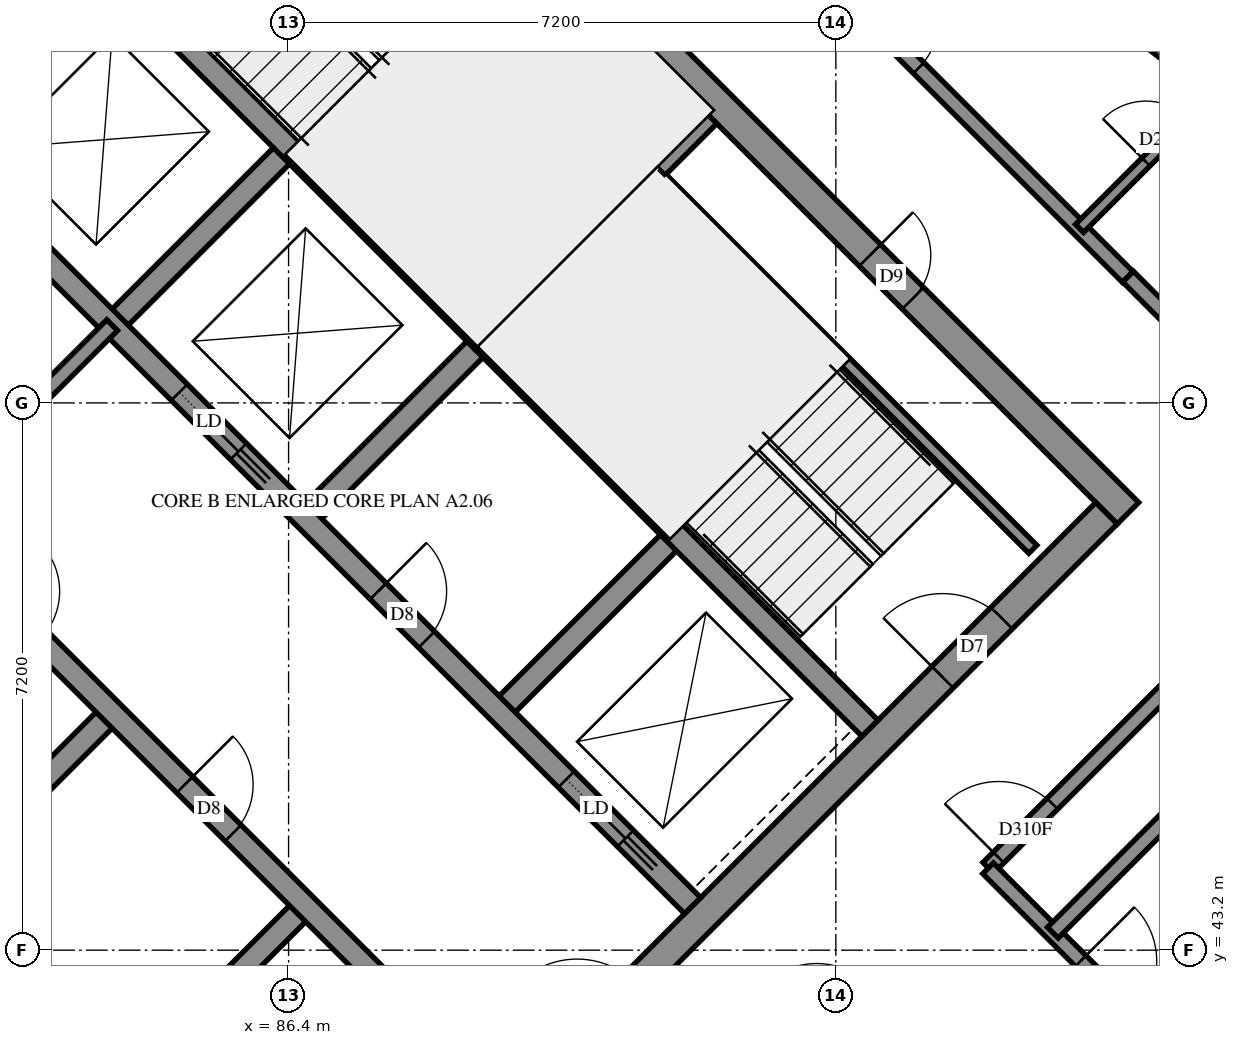
"""IFC4 building model, lengths in metres.
Left out: names, types, materials, properties, quantities, classifications, styles, units other than length and angle.
Written with IfcOpenShell. Run it as: python <this file> out.ifc"""

import sys

from ifc_helpers import new_model, si_unit, direction, frame, frame_2d, origin, place, context, subcontext, project, spatial, polyline, rectangle, outline, extrude, element, fill, save


model = new_model("IFC4")
c1 = context("Model", 3, precision=1e-05, world=origin(), true_north=direction((0.0, 1.0)))
c2 = subcontext(c1, "Body", "Model", "MODEL_VIEW")
j1 = project(units=[si_unit("LENGTHUNIT", "METRE"), si_unit("PLANEANGLEUNIT", "RADIAN")], contexts=[c1])
p1 = place(None, origin())
s1 = spatial("IfcSite", under=j1, at=p1, CompositionType="ELEMENT")
p2 = place(p1, origin())
s2 = spatial("IfcBuilding", under=s1, at=p2, CompositionType="ELEMENT")
p3 = place(p2, frame((0.0, 0.0, 260.8)))
s3 = spatial("IfcBuildingStorey", under=s2, at=p3, CompositionType="ELEMENT", Elevation=260.8)
p4 = place(p3, frame((76.23, 49.231, -0.3), z_axis=(0.0, 0.0, 1.0), x_axis=(0.7071034917, -0.7071100706, 0.0)))
e1 = element("IfcWall", 1, at=p4, inside=s3, PredefinedType="SHEAR", context=c2, shape_type="SweptSolid", body=[
    extrude(rectangle(XDim=15.2, YDim=0.4, at=frame_2d((7.6, 0.0))), origin(), (0.0, 0.0, 1.0), 2.7),
])
p5 = place(p3, frame((86.695, 59.696, -0.3), z_axis=(0.0, 0.0, 1.0), x_axis=(0.7071100706, -0.7071034917, 0.0)))
e2 = element("IfcWall", 2, at=p5, inside=s3, PredefinedType="SHEAR", context=c2, shape_type="SweptSolid", body=[
    extrude(rectangle(XDim=15.2, YDim=0.4, at=frame_2d((7.6, 0.0))), origin(), (0.0, 0.0, 1.0), 2.7),
])
p6 = place(p5, frame((10.4, 0.0, 0.3)))
e3 = element("IfcOpeningElement", 3, at=p6, cuts=e2, PredefinedType="OPENING", context=c2, shape_type="SweptSolid", body=[
    extrude(rectangle(XDim=0.8, YDim=2.1, at=frame_2d((0.4, 1.05))), frame((0.0, 0.21, 0.0), z_axis=(0.0, -1.0, 0.0), x_axis=(1.0, 0.0, 0.0)), (0.0, 0.0, 1.0), 0.42),
])
p7 = place(p3, frame((76.513, 49.231, -0.3), z_axis=(0.0, 0.0, 1.0), x_axis=(0.7071067812, 0.7071067812, 0.0)))
e4 = element("IfcWall", 4, at=p7, inside=s3, PredefinedType="SHEAR", context=c2, shape_type="SweptSolid", body=[
    extrude(rectangle(XDim=14.4, YDim=0.4, at=frame_2d((7.2, 0.0))), origin(), (0.0, 0.0, 1.0), 2.7),
])
p8 = place(p7, frame((4.55, 0.0, 0.3)))
e5 = element("IfcOpeningElement", 5, at=p8, cuts=e4, PredefinedType="OPENING", context=c2, shape_type="SweptSolid", body=[
    extrude(rectangle(XDim=1.1, YDim=2.1, at=frame_2d((0.55, 1.05))), frame((0.0, 0.21, 0.0), z_axis=(0.0, -1.0, 0.0), x_axis=(1.0, 0.0, 0.0)), (0.0, 0.0, 1.0), 0.42),
])
p9 = place(p7, frame((11.35, 0.0, 0.3)))
e6 = element("IfcOpeningElement", 6, at=p9, cuts=e4, PredefinedType="OPENING", context=c2, shape_type="SweptSolid", body=[
    extrude(rectangle(XDim=1.1, YDim=2.1, at=frame_2d((0.55, 1.05))), frame((0.0, 0.21, 0.0), z_axis=(0.0, -1.0, 0.0), x_axis=(1.0, 0.0, 0.0)), (0.0, 0.0, 1.0), 0.42),
])
p10 = place(p3, frame((86.978, 38.766, -0.3), z_axis=(0.0, 0.0, 1.0), x_axis=(0.7071067812, 0.7071067812, 0.0)))
e7 = element("IfcWall", 7, at=p10, inside=s3, PredefinedType="SHEAR", context=c2, shape_type="SweptSolid", body=[
    extrude(rectangle(XDim=14.4, YDim=0.4, at=frame_2d((7.2, 0.0))), origin(), (0.0, 0.0, 1.0), 2.7),
])
p11 = place(p10, frame((4.55, 0.0, 0.3)))
e8 = element("IfcOpeningElement", 8, at=p11, cuts=e7, PredefinedType="OPENING", context=c2, shape_type="SweptSolid", body=[
    extrude(rectangle(XDim=1.1, YDim=2.1, at=frame_2d((0.55, 1.05))), frame((0.0, 0.21, 0.0), z_axis=(0.0, -1.0, 0.0), x_axis=(1.0, 0.0, 0.0)), (0.0, 0.0, 1.0), 0.42),
])
p12 = place(p10, frame((11.35, 0.0, 0.3)))
e9 = element("IfcOpeningElement", 9, at=p12, cuts=e7, PredefinedType="OPENING", context=c2, shape_type="SweptSolid", body=[
    extrude(rectangle(XDim=1.1, YDim=2.1, at=frame_2d((0.55, 1.05))), frame((0.0, 0.21, 0.0), z_axis=(0.0, -1.0, 0.0), x_axis=(1.0, 0.0, 0.0)), (0.0, 0.0, 1.0), 0.42),
])
p13 = place(p3, frame((84.079, 51.423, 0.0), z_axis=(0.0, 0.0, 1.0), x_axis=(0.7071219326, 0.7070916295, 0.0)))
e10 = element("IfcWall", 10, at=p13, inside=s3, PredefinedType="SOLIDWALL", context=c2, shape_type="SweptSolid", body=[
    extrude(rectangle(XDim=3.3, YDim=0.3, at=frame_2d((1.65, 0.0))), origin(), (0.0, 0.0, 1.0), 3.1),
])
p14 = place(p3, frame((81.746, 43.999, 0.0), z_axis=(0.0, 0.0, 1.0), x_axis=(0.7071067812, 0.7071067812, 0.0)))
e11 = element("IfcWall", 11, at=p14, inside=s3, PredefinedType="SOLIDWALL", context=c2, shape_type="SweptSolid", body=[
    extrude(rectangle(XDim=3.3, YDim=0.3, at=frame_2d((1.65, 0.0))), origin(), (0.0, 0.0, 1.0), 3.1),
])
p15 = place(p3, frame((86.625, 48.878, 0.0), z_axis=(0.0, 0.0, 1.0), x_axis=(0.7071067812, 0.7071067812, 0.0)))
e12 = element("IfcWall", 12, at=p15, inside=s3, PredefinedType="SOLIDWALL", context=c2, shape_type="SweptSolid", body=[
    extrude(rectangle(XDim=3.3, YDim=0.3, at=frame_2d((1.65, 0.0))), origin(), (0.0, 0.0, 1.0), 3.1),
])
p16 = place(p3, frame((84.291, 41.453, 0.0), z_axis=(0.0, 0.0, 1.0), x_axis=(0.7071067812, 0.7071067812, 0.0)))
e13 = element("IfcWall", 13, at=p16, inside=s3, PredefinedType="SOLIDWALL", context=c2, shape_type="SweptSolid", body=[
    extrude(rectangle(XDim=3.3, YDim=0.3, at=frame_2d((1.65, 0.0))), origin(), (0.0, 0.0, 1.0), 3.1),
])
p17 = place(p3, frame((89.17, 46.332, 0.0), z_axis=(0.0, 0.0, 1.0), x_axis=(0.7071067812, 0.7071067812, 0.0)))
e14 = element("IfcWall", 14, at=p17, inside=s3, PredefinedType="SOLIDWALL", context=c2, shape_type="SweptSolid", body=[
    extrude(rectangle(XDim=3.3, YDim=0.3, at=frame_2d((1.65, 0.0))), origin(), (0.0, 0.0, 1.0), 3.1),
])
p18 = place(p3, frame((78.988, 51.423, 0.0), z_axis=(0.0, 0.0, 1.0), x_axis=(0.7071067812, -0.7071067812, 0.0)))
e15 = element("IfcWall", 15, at=p18, inside=s3, PredefinedType="SOLIDWALL", context=c2, shape_type="SweptSolid", body=[
    extrude(rectangle(XDim=14.4, YDim=0.3, at=frame_2d((7.2, 0.0))), origin(), (0.0, 0.0, 1.0), 3.1),
])
p19 = place(p18, frame((1.35, 0.0, 0.0)))
e16 = element("IfcOpeningElement", 16, at=p19, cuts=e15, PredefinedType="OPENING", context=c2, shape_type="SweptSolid", body=[
    extrude(rectangle(XDim=0.9, YDim=2.1, at=frame_2d((0.45, 1.05))), frame((0.0, 0.16, 0.0), z_axis=(0.0, -1.0, 0.0), x_axis=(1.0, 0.0, 0.0)), (0.0, 0.0, 1.0), 0.32),
])
p20 = place(p18, frame((4.95, 0.0, 0.0)))
e17 = element("IfcOpeningElement", 17, at=p20, cuts=e15, PredefinedType="OPENING", context=c2, shape_type="SweptSolid", body=[
    extrude(rectangle(XDim=0.9, YDim=2.1, at=frame_2d((0.45, 1.05))), frame((0.0, 0.16, 0.0), z_axis=(0.0, -1.0, 0.0), x_axis=(1.0, 0.0, 0.0)), (0.0, 0.0, 1.0), 0.32),
])
p21 = place(p18, frame((8.55, 0.0, 0.0)))
e18 = element("IfcOpeningElement", 18, at=p21, cuts=e15, PredefinedType="OPENING", context=c2, shape_type="SweptSolid", body=[
    extrude(rectangle(XDim=0.9, YDim=2.1, at=frame_2d((0.45, 1.05))), frame((0.0, 0.16, 0.0), z_axis=(0.0, -1.0, 0.0), x_axis=(1.0, 0.0, 0.0)), (0.0, 0.0, 1.0), 0.32),
])
p22 = place(p18, frame((12.05, 0.0, 0.0)))
e19 = element("IfcOpeningElement", 19, at=p22, cuts=e15, PredefinedType="OPENING", context=c2, shape_type="SweptSolid", body=[
    extrude(rectangle(XDim=1.1, YDim=2.1, at=frame_2d((0.55, 1.05))), frame((0.0, 0.16, 0.0), z_axis=(0.0, -1.0, 0.0), x_axis=(1.0, 0.0, 0.0)), (0.0, 0.0, 1.0), 0.32),
])
p23 = place(p3, frame((81.534, 53.969, 0.0), z_axis=(0.0, 0.0, 1.0), x_axis=(0.707103309, -0.7071102534, 0.0)))
e20 = element("IfcWall", 20, at=p23, inside=s3, PredefinedType="SOLIDWALL", context=c2, shape_type="SweptSolid", body=[
    extrude(rectangle(XDim=14.4, YDim=0.3, at=frame_2d((7.2, 0.0))), origin(), (0.0, 0.0, 1.0), 3.1),
])
p24 = place(p23, frame((8.55, 0.0, 0.0)))
e21 = element("IfcOpeningElement", 21, at=p24, cuts=e20, PredefinedType="OPENING", context=c2, shape_type="SweptSolid", body=[
    extrude(rectangle(XDim=0.9, YDim=2.1, at=frame_2d((0.45, 1.05))), frame((0.0, 0.16, 0.0), z_axis=(0.0, -1.0, 0.0), x_axis=(1.0, 0.0, 0.0)), (0.0, 0.0, 1.0), 0.32),
])
p25 = place(p23, frame((1.25, 0.0, 0.0)))
e22 = element("IfcOpeningElement", 22, at=p25, cuts=e20, PredefinedType="OPENING", context=c2, shape_type="SweptSolid", body=[
    extrude(rectangle(XDim=1.1, YDim=2.1, at=frame_2d((0.55, 1.05))), frame((0.0, 0.16, 0.0), z_axis=(0.0, -1.0, 0.0), x_axis=(1.0, 0.0, 0.0)), (0.0, 0.0, 1.0), 0.32),
])
p26 = place(p23, frame((4.85, 0.0, 0.0)))
e23 = element("IfcOpeningElement", 23, at=p26, cuts=e20, PredefinedType="OPENING", context=c2, shape_type="SweptSolid", body=[
    extrude(rectangle(XDim=1.1, YDim=2.1, at=frame_2d((0.55, 1.05))), frame((0.0, 0.16, 0.0), z_axis=(0.0, -1.0, 0.0), x_axis=(1.0, 0.0, 0.0)), (0.0, 0.0, 1.0), 0.32),
])
p27 = place(p23, frame((12.05, 0.0, 0.0)))
e24 = element("IfcOpeningElement", 24, at=p27, cuts=e20, PredefinedType="OPENING", context=c2, shape_type="SweptSolid", body=[
    extrude(rectangle(XDim=1.1, YDim=2.1, at=frame_2d((0.55, 1.05))), frame((0.0, 0.16, 0.0), z_axis=(0.0, -1.0, 0.0), x_axis=(1.0, 0.0, 0.0)), (0.0, 0.0, 1.0), 0.32),
])
for number, where, z_axis, x_axis in (
    (25, (83.867, 56.302, 0.0), (0.0, 0.0, 1.0), (0.707, -0.707, 0.0)),
    (26, (88.958, 51.211, 0.0), (0.0, 0.0, 1.0), (0.707, -0.707, 0.0)),
):
    element("IfcWall", number, at=place(p3, frame(where, z_axis=z_axis, x_axis=x_axis)), inside=s3, PredefinedType="SOLIDWALL", context=c2, shape_type="SweptSolid", body=[
        extrude(rectangle(XDim=7.2, YDim=0.3, at=frame_2d((3.6, 0.0))), origin(), (0.0, 0.0, 1.0), 3.1),
    ])
p28 = place(p3, frame((88.958, 51.211, 0.0), z_axis=(0.0, 0.0, 1.0), x_axis=(0.7071067812, 0.7071067812, 0.0)))
e27 = element("IfcWall", 27, at=p28, inside=s3, PredefinedType="SOLIDWALL", context=c2, shape_type="SweptSolid", body=[
    extrude(rectangle(XDim=4.2, YDim=0.3, at=frame_2d((2.1, 0.0))), origin(), (0.0, 0.0, 1.0), 3.1),
])
p29 = place(p3, frame((98.403, 54.811, 0.0), z_axis=(0.0, 0.0, 1.0), x_axis=(-0.795543631, 0.605896304, 0.0)))
e28 = element("IfcWall", 28, at=p29, inside=s3, PredefinedType="SOLIDWALL", context=c2, shape_type="SweptSolid", body=[
    extrude(outline(polyline([(-0.03, -0.225), (3.333, -0.225), (3.394, 0.225), (0.03, 0.225), (-0.03, -0.225)])), origin(), (0.0, 0.0, 1.0), 3.1),
])
p30 = place(p29, frame((1.251, 0.0, 0.45)))
e29 = element("IfcOpeningElement", 29, at=p30, cuts=e28, PredefinedType="OPENING", context=c2, shape_type="SweptSolid", body=[
    extrude(rectangle(XDim=1.2, YDim=2.55, at=frame_2d((0.6, 1.275))), frame((0.0, 0.235, 0.0), z_axis=(0.0, -1.0, 0.0), x_axis=(1.0, 0.0, 0.0)), (0.0, 0.0, 1.0), 0.47),
])
p31 = place(p3, frame((91.313, 53.354, 0.0), z_axis=(0.0, 0.0, 1.0), x_axis=(0.7071140275, -0.7070995348, 0.0)))
e30 = element("IfcWall", 30, at=p31, inside=s3, PredefinedType="PARTITIONING", context=c2, shape_type="SweptSolid", body=[
    extrude(rectangle(XDim=6.9, YDim=0.15, at=frame_2d((3.45, 0.0))), origin(), (0.0, 0.0, 1.0), 3.1),
])
p32 = place(p3, frame((81.534, 48.878, 0.0), z_axis=(0.0, 0.0, 1.0), x_axis=(0.707092892, 0.7071206701, 0.0)))
e31 = element("IfcWall", 31, at=p32, inside=s3, PredefinedType="PARTITIONING", context=c2, shape_type="SweptSolid", body=[
    extrude(rectangle(XDim=3.6, YDim=0.2, at=frame_2d((1.8, 0.0))), origin(), (0.0, 0.0, 1.0), 3.1),
])
p33 = place(p3, frame((95.605, 44.283, 0.0), z_axis=(0.0, 0.0, 1.0), x_axis=(0.7071067812, 0.7071067812, 0.0)))
e32 = element("IfcWall", 32, at=p33, inside=s3, PredefinedType="PARTITIONING", context=c2, shape_type="SweptSolid", body=[
    extrude(rectangle(XDim=6.8, YDim=0.2, at=frame_2d((3.4, 0.0))), origin(), (0.0, 0.0, 1.0), 3.1),
])
p34 = place(p33, frame((0.193, 0.0, 0.0)))
e33 = element("IfcOpeningElement", 33, at=p34, cuts=e32, PredefinedType="OPENING", context=c2, shape_type="SweptSolid", body=[
    extrude(rectangle(XDim=1.0, YDim=2.1, at=frame_2d((0.5, 1.05))), frame((0.0, 0.11, 0.0), z_axis=(0.0, -1.0, 0.0), x_axis=(1.0, 0.0, 0.0)), (0.0, 0.0, 1.0), 0.22),
])
p35 = place(p3, frame((93.621, 55.875, 0.0), z_axis=(0.0, 0.0, 1.0), x_axis=(0.7071623255, -0.7070512325, 0.0)))
e34 = element("IfcWall", 34, at=p35, inside=s3, PredefinedType="PARTITIONING", context=c2, shape_type="SweptSolid", body=[
    extrude(rectangle(XDim=5.401, YDim=0.2, at=frame_2d((2.7, 0.0))), origin(), (0.0, 0.0, 1.0), 3.1),
])
p36 = place(p35, frame((0.611, 0.0, 0.0)))
e35 = element("IfcOpeningElement", 35, at=p36, cuts=e34, PredefinedType="OPENING", context=c2, shape_type="SweptSolid", body=[
    extrude(rectangle(XDim=0.9, YDim=2.1, at=frame_2d((0.45, 1.05))), frame((0.0, 0.11, 0.0), z_axis=(0.0, -1.0, 0.0), x_axis=(1.0, 0.0, 0.0)), (0.0, 0.0, 1.0), 0.22),
])
p37 = place(p3, frame((95.603, 44.277, 0.0), z_axis=(0.0, 0.0, 1.0), x_axis=(0.7071067812, -0.7071067812, 0.0)))
e36 = element("IfcWall", 36, at=p37, inside=s3, PredefinedType="PARTITIONING", context=c2, shape_type="SweptSolid", body=[
    extrude(rectangle(XDim=4.797, YDim=0.2, at=frame_2d((2.398, 0.0))), origin(), (0.0, 0.0, 1.0), 3.1),
])
p38 = place(p37, frame((1.723, 0.0, 0.0)))
e37 = element("IfcOpeningElement", 37, at=p38, cuts=e36, PredefinedType="OPENING", context=c2, shape_type="SweptSolid", body=[
    extrude(rectangle(XDim=1.0, YDim=2.1, at=frame_2d((0.5, 1.05))), frame((0.0, 0.11, 0.0), z_axis=(0.0, -1.0, 0.0), x_axis=(1.0, 0.0, 0.0)), (0.0, 0.0, 1.0), 0.22),
])
p39 = place(p3, frame((96.455, 43.431, 0.0), z_axis=(0.0, 0.0, 1.0), x_axis=(0.7068409254, 0.707372537, 0.0)))
e38 = element("IfcWall", 38, at=p39, inside=s3, PredefinedType="PARTITIONING", context=c2, shape_type="SweptSolid", body=[
    extrude(rectangle(XDim=3.95, YDim=0.2, at=frame_2d((1.975, 0.0))), origin(), (0.0, 0.0, 1.0), 3.1),
])
p40 = place(p3, frame((96.806, 52.696, 0.0), z_axis=(0.0, 0.0, 1.0), x_axis=(0.7071067812, 0.7071067812, 0.0)))
e39 = element("IfcWall", 39, at=p40, inside=s3, PredefinedType="PARTITIONING", context=c2, shape_type="SweptSolid", body=[
    extrude(rectangle(XDim=2.348, YDim=0.15, at=frame_2d((1.174, 0.0))), origin(), (0.0, 0.0, 1.0), 3.1),
])
p41 = place(p40, frame((1.236, 0.0, 0.0)))
e40 = element("IfcOpeningElement", 40, at=p41, cuts=e39, PredefinedType="OPENING", context=c2, shape_type="SweptSolid", body=[
    extrude(rectangle(XDim=0.8, YDim=2.1, at=frame_2d((0.4, 1.05))), frame((0.0, 0.085, 0.0), z_axis=(0.0, -1.0, 0.0), x_axis=(1.0, 0.0, 0.0)), (0.0, 0.0, 1.0), 0.17),
])
p42 = place(p3, frame((97.445, 52.061, 0.0), z_axis=(0.0, 0.0, 1.0), x_axis=(0.7059292536, -0.7082823511, 0.0)))
e41 = element("IfcWall", 41, at=p42, inside=s3, PredefinedType="PARTITIONING", context=c2, shape_type="SweptSolid", body=[
    extrude(rectangle(XDim=0.85, YDim=0.2, at=frame_2d((0.425, 0.0))), origin(), (0.0, 0.0, 1.0), 3.1),
])
p43 = place(p6, origin())
e42 = element("IfcDoor", 42, at=p43, inside=s3, OperationType="SINGLE_SWING_RIGHT", PredefinedType="DOOR", context=c2, shape_type="SweptSolid", body=[
    extrude(rectangle(XDim=0.8, YDim=2.1, at=frame_2d((0.4, 1.05))), frame((0.0, 0.025, 0.0), z_axis=(0.0, -1.0, 0.0), x_axis=(1.0, 0.0, 0.0)), (0.0, 0.0, 1.0), 0.05),
])
fill(e3, e42)
p44 = place(p12, origin())
e43 = element("IfcDoor", 43, at=p44, inside=s3, OperationType="SINGLE_SWING_RIGHT", PredefinedType="DOOR", context=c2, shape_type="SweptSolid", body=[
    extrude(rectangle(XDim=1.1, YDim=2.1, at=frame_2d((0.55, 1.05))), frame((0.0, 0.025, 0.0), z_axis=(0.0, -1.0, 0.0), x_axis=(1.0, 0.0, 0.0)), (0.0, 0.0, 1.0), 0.05),
])
fill(e9, e43)
p45 = place(p21, origin())
e44 = element("IfcDoor", 44, at=p45, inside=s3, OperationType="SINGLE_SWING_LEFT", PredefinedType="DOOR", context=c2, shape_type="SweptSolid", body=[
    extrude(rectangle(XDim=0.9, YDim=2.1, at=frame_2d((0.45, 1.05))), frame((0.0, 0.025, 0.0), z_axis=(0.0, -1.0, 0.0), x_axis=(1.0, 0.0, 0.0)), (0.0, 0.0, 1.0), 0.05),
])
fill(e18, e44)
p46 = place(p24, origin())
e45 = element("IfcDoor", 45, at=p46, inside=s3, OperationType="SINGLE_SWING_LEFT", PredefinedType="DOOR", context=c2, shape_type="SweptSolid", body=[
    extrude(rectangle(XDim=0.9, YDim=2.1, at=frame_2d((0.45, 1.05))), frame((0.0, 0.025, 0.0), z_axis=(0.0, -1.0, 0.0), x_axis=(1.0, 0.0, 0.0)), (0.0, 0.0, 1.0), 0.05),
])
fill(e21, e45)
p47 = place(p26, origin())
e46 = element("IfcDoor", 46, at=p47, inside=s3, OperationType="SLIDING_TO_RIGHT", PredefinedType="DOOR", context=c2, shape_type="SweptSolid", body=[
    extrude(rectangle(XDim=1.1, YDim=2.1, at=frame_2d((0.55, 1.05))), frame((0.0, 0.025, 0.0), z_axis=(0.0, -1.0, 0.0), x_axis=(1.0, 0.0, 0.0)), (0.0, 0.0, 1.0), 0.05),
])
fill(e23, e46)
p48 = place(p27, origin())
e47 = element("IfcDoor", 47, at=p48, inside=s3, OperationType="SLIDING_TO_RIGHT", PredefinedType="DOOR", context=c2, shape_type="SweptSolid", body=[
    extrude(rectangle(XDim=1.1, YDim=2.1, at=frame_2d((0.55, 1.05))), frame((0.0, 0.025, 0.0), z_axis=(0.0, -1.0, 0.0), x_axis=(1.0, 0.0, 0.0)), (0.0, 0.0, 1.0), 0.05),
])
fill(e24, e47)
p49 = place(p34, origin())
e48 = element("IfcDoor", 48, at=p49, inside=s3, OperationType="SINGLE_SWING_LEFT", PredefinedType="DOOR", context=c2, shape_type="SweptSolid", body=[
    extrude(rectangle(XDim=1.0, YDim=2.1, at=frame_2d((0.5, 1.05))), frame((0.0, 0.025, 0.0), z_axis=(0.0, -1.0, 0.0), x_axis=(1.0, 0.0, 0.0)), (0.0, 0.0, 1.0), 0.05),
])
fill(e33, e48)
p50 = place(p36, origin())
e49 = element("IfcDoor", 49, at=p50, inside=s3, OperationType="SINGLE_SWING_LEFT", PredefinedType="DOOR", context=c2, shape_type="SweptSolid", body=[
    extrude(rectangle(XDim=0.9, YDim=2.1, at=frame_2d((0.45, 1.05))), frame((0.0, 0.025, 0.0), z_axis=(0.0, -1.0, 0.0), x_axis=(1.0, 0.0, 0.0)), (0.0, 0.0, 1.0), 0.05),
])
fill(e35, e49)
p51 = place(p41, origin())
e50 = element("IfcDoor", 50, at=p51, inside=s3, OperationType="SINGLE_SWING_RIGHT", PredefinedType="DOOR", context=c2, shape_type="SweptSolid", body=[
    extrude(rectangle(XDim=0.8, YDim=2.1, at=frame_2d((0.4, 1.05))), frame((0.0, 0.025, 0.0), z_axis=(0.0, -1.0, 0.0), x_axis=(1.0, 0.0, 0.0)), (0.0, 0.0, 1.0), 0.05),
])
fill(e40, e50)
p52 = place(p38, origin())
e51 = element("IfcDoor", 51, at=p52, inside=s3, OperationType="SINGLE_SWING_RIGHT", PredefinedType="DOOR", context=c2, shape_type="SweptSolid", body=[
    extrude(rectangle(XDim=1.0, YDim=2.1, at=frame_2d((0.5, 1.05))), frame((0.0, 0.025, 0.0), z_axis=(0.0, -1.0, 0.0), x_axis=(1.0, 0.0, 0.0)), (0.0, 0.0, 1.0), 0.05),
])
fill(e37, e51)
save(model, sys.argv[1])
